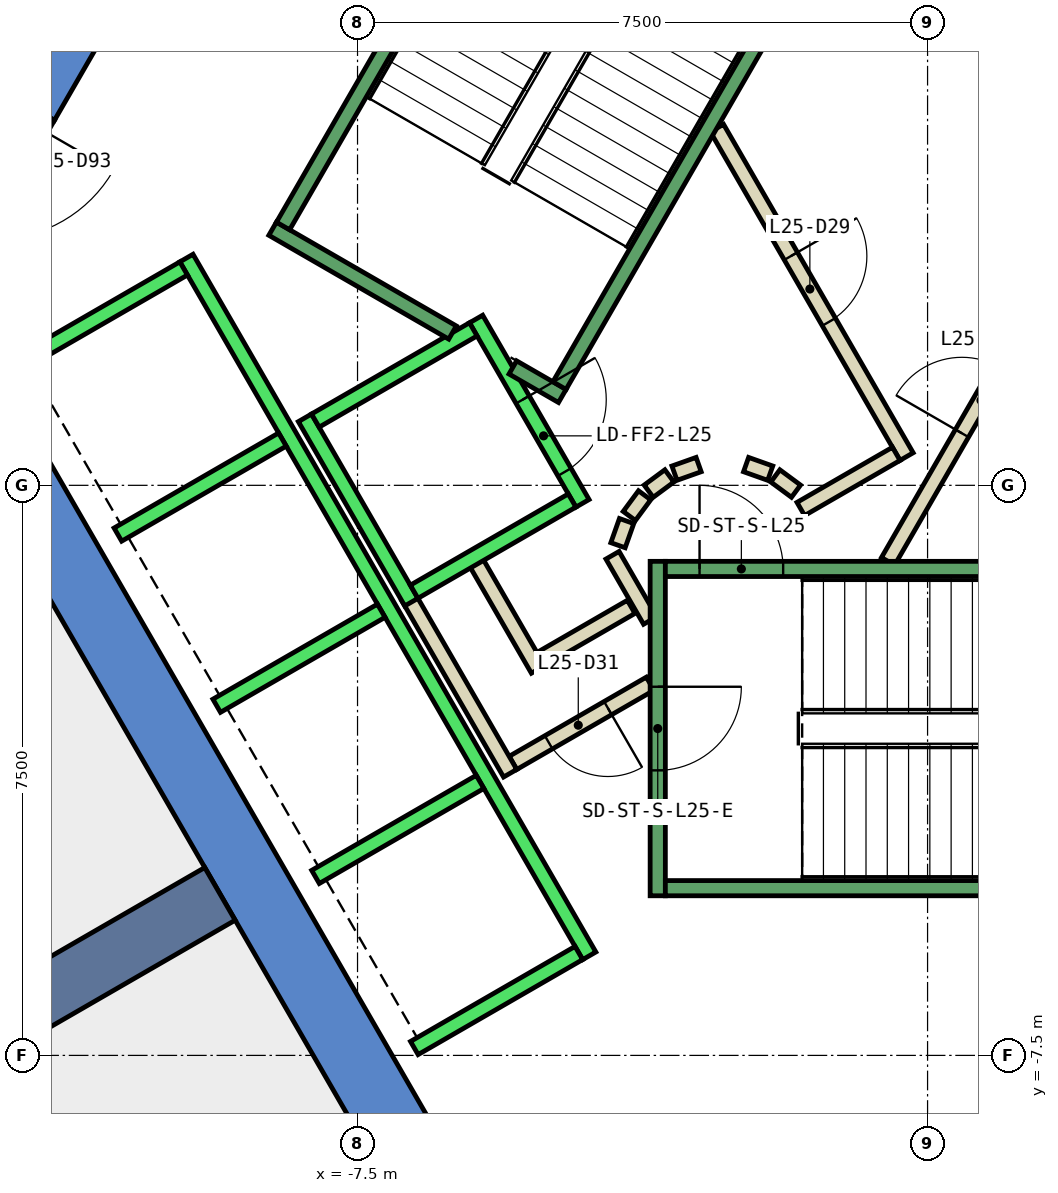
"""IFC4 building model, lengths in metres.
Left out: names, types, materials, properties, quantities, classifications, styles, units other than length and angle.
Written with IfcOpenShell. Run it as: python <this file> out.ifc"""

import sys

from ifc_helpers import new_model, si_unit, direction, frame, frame_2d, origin, place, context, subcontext, project, spatial, polyline, rectangle, outline, extrude, element, fill, save


model = new_model("IFC4")
c1 = context("Model", 3, precision=1e-05, world=origin(), true_north=direction((0.0, 1.0)))
c2 = subcontext(c1, "Body", "Model", "MODEL_VIEW")
j1 = project(units=[si_unit("LENGTHUNIT", "METRE"), si_unit("PLANEANGLEUNIT", "RADIAN")], contexts=[c1])
p1 = place(None, origin())
s1 = spatial("IfcSite", under=j1, at=p1, CompositionType="ELEMENT")
p2 = place(p1, origin())
s2 = spatial("IfcBuilding", under=s1, at=p2, CompositionType="ELEMENT")
p3 = place(p2, frame((0.0, 0.0, 116.0)))
s3 = spatial("IfcBuildingStorey", under=s2, at=p3, CompositionType="ELEMENT", Elevation=116.0)
p4 = place(p3, frame((0.0, 0.0, -0.4)))
e1 = element("IfcWall", 1, at=p4, inside=s3, PredefinedType="SHEAR", context=c2, shape_type="SweptSolid", body=[
    extrude(outline(polyline([(-12.267, 5.252), (-11.488, 4.802), (-6.409, 13.6), (-6.928, 14.5), (-12.267, 5.252)])), origin(), (0.0, 0.0, 1.0), 4.2),
])
p5 = place(p3, frame((0.0, 0.0, 3.6)))
e2 = element("IfcWall", 2, at=p5, inside=s3, PredefinedType="SHEAR", context=c2, shape_type="SweptSolid", body=[
    extrude(outline(polyline([(-13.267, 3.52), (-12.488, 3.07), (-11.488, 4.802), (-12.267, 5.252), (-13.267, 3.52)])), origin(), (0.0, 0.0, 1.0), 0.2),
])
p6 = place(p3, frame((0.0, 0.0, -0.4)))
e3 = element("IfcWall", 3, at=p6, inside=s3, PredefinedType="SHEAR", context=c2, shape_type="SweptSolid", body=[
    extrude(outline(polyline([(-13.856, 2.5), (-6.928, -9.5), (-6.409, -8.6), (-12.817, 2.5), (-13.856, 2.5)])), origin(), (0.0, 0.0, 1.0), 4.2),
])
p7 = place(p3, frame((-9.31, -5.375, -0.4), z_axis=(0.0, 0.0, 1.0), x_axis=(-0.866017533419, -0.500013631625, 0.0)))
e4 = element("IfcWall", 4, at=p7, inside=s3, PredefinedType="SHEAR", context=c2, shape_type="SweptSolid", body=[
    extrude(rectangle(XDim=9.0, YDim=0.8, at=frame_2d((4.5, 0.0))), origin(), (0.0, 0.0, 1.0), 4.2),
])
p8 = place(p3, frame((-3.9, -1.599, 0.0), z_axis=(0.0, 0.0, 1.0), x_axis=(-0.865969445389, -0.500096910261, 0.0)))
e5 = element("IfcWall", 5, at=p8, inside=s3, PredefinedType="PARTITIONING", context=c2, shape_type="SweptSolid", body=[
    extrude(rectangle(XDim=1.373, YDim=0.2, at=frame_2d((0.687, 0.0))), origin(), (0.0, 0.0, 1.0), 3.8),
])
p9 = place(p3, frame((-5.126, -2.422, 0.0), z_axis=(0.0, 0.0, 1.0), x_axis=(-0.500062241894, 0.865989465428, 0.0)))
e6 = element("IfcWall", 6, at=p9, inside=s3, PredefinedType="PARTITIONING", context=c2, shape_type="SweptSolid", body=[
    extrude(rectangle(XDim=1.7, YDim=0.2, at=frame_2d((0.85, 0.0))), origin(), (0.0, 0.0, 1.0), 3.8),
])
p10 = place(p3, frame((-3.65, -2.61, 0.0), z_axis=(0.0, 0.0, 1.0), x_axis=(-0.866072462134, -0.499918483688, 0.0)))
e7 = element("IfcWall", 7, at=p10, inside=s3, PredefinedType="PARTITIONING", context=c2, shape_type="SweptSolid", body=[
    extrude(rectangle(XDim=2.084, YDim=0.2, at=frame_2d((1.042, 0.0))), origin(), (0.0, 0.0, 1.0), 3.8),
])
p11 = place(p10, frame((0.642, 0.0, 0.0)))
e8 = element("IfcOpeningElement", 8, at=p11, cuts=e7, PredefinedType="OPENING", context=c2, shape_type="SweptSolid", body=[
    extrude(rectangle(XDim=0.9, YDim=2.1, at=frame_2d((0.45, 1.05))), frame((0.0, 0.11, 0.0), z_axis=(0.0, -1.0, 0.0), x_axis=(1.0, 0.0, 0.0)), (0.0, 0.0, 1.0), 0.22),
])
p12 = place(p3, frame((-5.492, -3.788, 0.0), z_axis=(0.0, 0.0, 1.0), x_axis=(-0.500008949224, 0.866020236886, 0.0)))
e9 = element("IfcWall", 9, at=p12, inside=s3, PredefinedType="PARTITIONING", context=c2, shape_type="SweptSolid", body=[
    extrude(rectangle(XDim=2.68, YDim=0.2, at=frame_2d((1.34, 0.0))), origin(), (0.0, 0.0, 1.0), 3.8),
])
p13 = place(p3, frame((-4.145, -0.92, 0.0), z_axis=(0.0, 0.0, 1.0), x_axis=(0.499743786207, -0.866173278362, 0.0)))
e10 = element("IfcWall", 10, at=p13, inside=s3, PredefinedType="PARTITIONING", context=c2, shape_type="SweptSolid", body=[
    extrude(rectangle(XDim=0.991, YDim=0.2, at=frame_2d((0.495, 0.0))), origin(), (0.0, 0.0, 1.0), 3.8),
])
p14 = place(p3, frame((-0.52, -1.0, 0.0), z_axis=(0.0, 0.0, 1.0), x_axis=(0.50011622646, 0.865958290007, 0.0)))
e11 = element("IfcWall", 11, at=p14, inside=s3, PredefinedType="PARTITIONING", context=c2, shape_type="SweptSolid", body=[
    extrude(rectangle(XDim=4.991, YDim=0.2, at=frame_2d((2.496, 0.0))), origin(), (0.0, 0.0, 1.0), 3.8),
])
p15 = place(p14, frame((1.945, 0.0, 0.0)))
e12 = element("IfcOpeningElement", 12, at=p15, cuts=e11, PredefinedType="OPENING", context=c2, shape_type="SweptSolid", body=[
    extrude(rectangle(XDim=1.0, YDim=2.1, at=frame_2d((0.5, 1.05))), frame((0.0, 0.11, 0.0), z_axis=(0.0, -1.0, 0.0), x_axis=(1.0, 0.0, 0.0)), (0.0, 0.0, 1.0), 0.22),
])
p16 = place(p3, frame((-2.771, 4.7, 0.0), z_axis=(0.0, 0.0, 1.0), x_axis=(0.499969479948, -0.866043023828, 0.0)))
e13 = element("IfcWall", 13, at=p16, inside=s3, PredefinedType="PARTITIONING", context=c2, shape_type="SweptSolid", body=[
    extrude(rectangle(XDim=4.99, YDim=0.2, at=frame_2d((2.495, 0.0))), origin(), (0.0, 0.0, 1.0), 3.8),
])
p17 = place(p16, frame((1.945, 0.0, 0.0)))
e14 = element("IfcOpeningElement", 14, at=p17, cuts=e13, PredefinedType="OPENING", context=c2, shape_type="SweptSolid", body=[
    extrude(rectangle(XDim=1.0, YDim=2.1, at=frame_2d((0.5, 1.05))), frame((0.0, 0.11, 0.0), z_axis=(0.0, -1.0, 0.0), x_axis=(1.0, 0.0, 0.0)), (0.0, 0.0, 1.0), 0.22),
])
p18 = place(p3, frame((-0.412, 0.414, 0.0), z_axis=(0.0, 0.0, 1.0), x_axis=(-0.866017369001, -0.500013916395, 0.0)))
e15 = element("IfcWall", 15, at=p18, inside=s3, PredefinedType="PARTITIONING", context=c2, shape_type="SweptSolid", body=[
    extrude(rectangle(XDim=1.45, YDim=0.2, at=frame_2d((0.725, 0.0))), origin(), (0.0, 0.0, 1.0), 3.8),
])
p19 = place(p3, frame((-1.731, -0.077, 0.0), z_axis=(0.0, 0.0, 1.0), x_axis=(-0.804311165252, 0.594208338422, 0.0)))
e16 = element("IfcWall", 16, at=p19, inside=s3, PredefinedType="PARTITIONING", context=c2, shape_type="SweptSolid", body=[
    extrude(rectangle(XDim=0.338, YDim=0.2, at=frame_2d((0.169, 0.0))), origin(), (0.0, 0.0, 1.0), 3.8),
])
p20 = place(p3, frame((-2.07, 0.16, 0.0), z_axis=(0.0, 0.0, 1.0), x_axis=(-0.942199461132, 0.335052496547, 0.0)))
e17 = element("IfcWall", 17, at=p20, inside=s3, PredefinedType="PARTITIONING", context=c2, shape_type="SweptSolid", body=[
    extrude(rectangle(XDim=0.337, YDim=0.2, at=frame_2d((0.169, 0.0))), origin(), (0.0, 0.0, 1.0), 3.8),
])
p21 = place(p3, frame((-3.012, 0.273, 0.0), z_axis=(0.0, 0.0, 1.0), x_axis=(-0.942280615813, -0.334824194261, 0.0)))
e18 = element("IfcWall", 18, at=p21, inside=s3, PredefinedType="PARTITIONING", context=c2, shape_type="SweptSolid", body=[
    extrude(rectangle(XDim=0.338, YDim=0.2, at=frame_2d((0.169, 0.0))), origin(), (0.0, 0.0, 1.0), 3.8),
])
p22 = place(p3, frame((-3.397, 0.124, 0.0), z_axis=(0.0, 0.0, 1.0), x_axis=(-0.804311165252, -0.594208338422, 0.0)))
e19 = element("IfcWall", 19, at=p22, inside=s3, PredefinedType="PARTITIONING", context=c2, shape_type="SweptSolid", body=[
    extrude(rectangle(XDim=0.338, YDim=0.2, at=frame_2d((0.169, 0.0))), origin(), (0.0, 0.0, 1.0), 3.8),
])
p23 = place(p3, frame((-3.723, -0.131, 0.0), z_axis=(0.0, 0.0, 1.0), x_axis=(-0.594675113454, -0.803966112121, 0.0)))
e20 = element("IfcWall", 20, at=p23, inside=s3, PredefinedType="PARTITIONING", context=c2, shape_type="SweptSolid", body=[
    extrude(rectangle(XDim=0.338, YDim=0.2, at=frame_2d((0.169, 0.0))), origin(), (0.0, 0.0, 1.0), 3.8),
])
p24 = place(p3, frame((-3.96, -0.47, 0.0), z_axis=(0.0, 0.0, 1.0), x_axis=(-0.334824194261, -0.942280615813, 0.0)))
e21 = element("IfcWall", 21, at=p24, inside=s3, PredefinedType="PARTITIONING", context=c2, shape_type="SweptSolid", body=[
    extrude(rectangle(XDim=0.338, YDim=0.2, at=frame_2d((0.169, 0.0))), origin(), (0.0, 0.0, 1.0), 3.8),
])
p25 = place(p3, frame((-5.94, 2.188, 0.0), z_axis=(0.0, 0.0, 1.0), x_axis=(0.49994636267, -0.866056369097, 0.0)))
e22 = element("IfcWall", 22, at=p25, inside=s3, PredefinedType="STANDARD", context=c2, shape_type="SweptSolid", body=[
    extrude(rectangle(XDim=2.8, YDim=0.2, at=frame_2d((1.4, 0.0))), origin(), (0.0, 0.0, 1.0), 3.8),
])
p26 = place(p25, frame((1.225, 0.0, 0.0)))
e23 = element("IfcOpeningElement", 23, at=p26, cuts=e22, PredefinedType="OPENING", context=c2, shape_type="SweptSolid", body=[
    extrude(rectangle(XDim=1.1, YDim=2.1, at=frame_2d((0.55, 1.05))), frame((0.0, 0.11, 0.0), z_axis=(0.0, -1.0, 0.0), x_axis=(1.0, 0.0, 0.0)), (0.0, 0.0, 1.0), 0.22),
])
p27 = place(p3, frame((-8.192, 0.888, 0.0), z_axis=(0.0, 0.0, 1.0), x_axis=(0.49994636267, -0.866056369097, 0.0)))
e24 = element("IfcWall", 24, at=p27, inside=s3, PredefinedType="STANDARD", context=c2, shape_type="SweptSolid", body=[
    extrude(rectangle(XDim=2.8, YDim=0.2, at=frame_2d((1.4, 0.0))), origin(), (0.0, 0.0, 1.0), 3.8),
])
for number, where, z_axis, x_axis in (
    (25, (-5.977, 2.052, 0.0), (0.0, 0.0, 1.0), (-0.866, -0.5, 0.0)),
    (26, (-4.677, -0.2, 0.0), (0.0, 0.0, 1.0), (-0.866, -0.5, 0.0)),
):
    element("IfcWall", number, at=place(p3, frame(where, z_axis=z_axis, x_axis=x_axis)), inside=s3, PredefinedType="STANDARD", context=c2, shape_type="SweptSolid", body=[
        extrude(rectangle(XDim=2.399, YDim=0.2, at=frame_2d((1.2, 0.0))), origin(), (0.0, 0.0, 1.0), 3.8),
    ])
p28 = place(p3, frame((-9.751, 2.99, 0.0), z_axis=(0.0, 0.0, 1.0), x_axis=(0.50000090737, -0.866024879913, 0.0)))
e27 = element("IfcWall", 27, at=p28, inside=s3, PredefinedType="STANDARD", context=c2, shape_type="SweptSolid", body=[
    extrude(rectangle(XDim=10.6, YDim=0.2, at=frame_2d((5.3, 0.0))), origin(), (0.0, 0.0, 1.0), 3.8),
])
p29 = place(p3, frame((-9.788, 2.853, 0.0), z_axis=(0.0, 0.0, 1.0), x_axis=(-0.865998541277, -0.500046524342, 0.0)))
e28 = element("IfcWall", 28, at=p29, inside=s3, PredefinedType="STANDARD", context=c2, shape_type="SweptSolid", body=[
    extrude(rectangle(XDim=2.5, YDim=0.2, at=frame_2d((1.25, 0.0))), origin(), (0.0, 0.0, 1.0), 3.8),
])
for number, where, z_axis, x_axis in (
    (29, (-8.488, 0.602, 0.0), (0.0, 0.0, 1.0), (-0.866, -0.5, 0.0)),
    (30, (-7.188, -1.65, 0.0), (0.0, 0.0, 1.0), (-0.866, -0.5, 0.0)),
    (31, (-5.888, -3.902, 0.0), (0.0, 0.0, 1.0), (-0.866, -0.5, 0.0)),
    (32, (-4.588, -6.153, 0.0), (0.0, 0.0, 1.0), (-0.866, -0.5, 0.0)),
):
    element("IfcWall", number, at=place(p3, frame(where, z_axis=z_axis, x_axis=x_axis)), inside=s3, PredefinedType="STANDARD", context=c2, shape_type="SweptSolid", body=[
        extrude(rectangle(XDim=2.5, YDim=0.2, at=frame_2d((1.25, 0.0))), origin(), (0.0, 0.0, 1.0), 3.8),
    ])
p30 = place(p3, frame((-3.55, -1.0, 0.0), z_axis=(0.0, 0.0, 1.0), x_axis=(0.0, -1.0, 0.0)))
e33 = element("IfcWall", 33, at=p30, inside=s3, PredefinedType="STANDARD", context=c2, shape_type="SweptSolid", body=[
    extrude(rectangle(XDim=4.4, YDim=0.2, at=frame_2d((2.2, 0.0))), origin(), (0.0, 0.0, 1.0), 3.8),
])
p31 = place(p30, frame((1.65, 0.0, 0.0)))
e34 = element("IfcOpeningElement", 34, at=p31, cuts=e33, PredefinedType="OPENING", context=c2, shape_type="SweptSolid", body=[
    extrude(rectangle(XDim=1.1, YDim=2.2, at=frame_2d((0.55, 1.1))), frame((0.0, 0.11, 0.0), z_axis=(0.0, -1.0, 0.0), x_axis=(1.0, 0.0, 0.0)), (0.0, 0.0, 1.0), 0.22),
])
p32 = place(p3, frame((-3.45, -1.1, 0.0), z_axis=(0.0, 0.0, 1.0), x_axis=(1.0, 0.0, 0.0)))
e35 = element("IfcWall", 35, at=p32, inside=s3, PredefinedType="STANDARD", context=c2, shape_type="SweptSolid", body=[
    extrude(rectangle(XDim=6.9, YDim=0.2, at=frame_2d((3.45, 0.0))), origin(), (0.0, 0.0, 1.0), 3.8),
])
p33 = place(p32, frame((0.45, 0.0, 0.0)))
e36 = element("IfcOpeningElement", 36, at=p33, cuts=e35, PredefinedType="OPENING", context=c2, shape_type="SweptSolid", body=[
    extrude(rectangle(XDim=1.1, YDim=2.2, at=frame_2d((0.55, 1.1))), frame((0.0, 0.11, 0.0), z_axis=(0.0, -1.0, 0.0), x_axis=(1.0, 0.0, 0.0)), (0.0, 0.0, 1.0), 0.22),
])
p34 = place(p3, frame((-3.45, -5.3, 0.0), z_axis=(0.0, 0.0, 1.0), x_axis=(1.0, 0.0, 0.0)))
e37 = element("IfcWall", 37, at=p34, inside=s3, PredefinedType="STANDARD", context=c2, shape_type="SweptSolid", body=[
    extrude(rectangle(XDim=6.9, YDim=0.2, at=frame_2d((3.45, 0.0))), origin(), (0.0, 0.0, 1.0), 3.8),
])
p35 = place(p3, frame((-6.25, 2.01, 0.0), z_axis=(0.0, 0.0, 1.0), x_axis=(-0.86611865017, 0.499838457731, 0.0)))
e38 = element("IfcWall", 38, at=p35, inside=s3, PredefinedType="STANDARD", context=c2, shape_type="SweptSolid", body=[
    extrude(rectangle(XDim=2.733, YDim=0.2, at=frame_2d((1.366, 0.0))), origin(), (0.0, 0.0, 1.0), 3.8),
])
p36 = place(p3, frame((-4.806, 1.176, 0.0), z_axis=(0.0, 0.0, 1.0), x_axis=(-0.866558586415, 0.499075361355, 0.0)))
e39 = element("IfcWall", 39, at=p36, inside=s3, PredefinedType="STANDARD", context=c2, shape_type="SweptSolid", body=[
    extrude(rectangle(XDim=0.751, YDim=0.2, at=frame_2d((0.376, 0.0))), origin(), (0.0, 0.0, 1.0), 3.8),
])
p37 = place(p3, frame((-1.393, 7.288, 0.0), z_axis=(0.0, 0.0, 1.0), x_axis=(-0.499963383562, -0.866046543262, 0.0)))
e40 = element("IfcWall", 40, at=p37, inside=s3, PredefinedType="STANDARD", context=c2, shape_type="SweptSolid", body=[
    extrude(rectangle(XDim=6.9, YDim=0.2, at=frame_2d((3.45, 0.0))), origin(), (0.0, 0.0, 1.0), 3.8),
])
p38 = place(p37, frame((0.45, 0.0, 0.0)))
e41 = element("IfcOpeningElement", 41, at=p38, cuts=e40, PredefinedType="OPENING", context=c2, shape_type="SweptSolid", body=[
    extrude(rectangle(XDim=1.1, YDim=2.2, at=frame_2d((0.55, 1.1))), frame((0.0, 0.11, 0.0), z_axis=(0.0, -1.0, 0.0), x_axis=(1.0, 0.0, 0.0)), (0.0, 0.0, 1.0), 0.22),
])
p39 = place(p3, frame((-5.03, 9.388, 0.0), z_axis=(0.0, 0.0, 1.0), x_axis=(-0.499978703459, -0.866037698999, 0.0)))
e42 = element("IfcWall", 42, at=p39, inside=s3, PredefinedType="STANDARD", context=c2, shape_type="SweptSolid", body=[
    extrude(rectangle(XDim=6.9, YDim=0.2, at=frame_2d((3.45, 0.0))), origin(), (0.0, 0.0, 1.0), 3.8),
])
p40 = place(p15, origin())
e43 = element("IfcDoor", 43, at=p40, inside=s3, OperationType="SINGLE_SWING_LEFT", PredefinedType="DOOR", context=c2, shape_type="SweptSolid", body=[
    extrude(rectangle(XDim=1.0, YDim=2.1, at=frame_2d((0.5, 1.05))), frame((0.0, 0.025, 0.0), z_axis=(0.0, -1.0, 0.0), x_axis=(1.0, 0.0, 0.0)), (0.0, 0.0, 1.0), 0.05),
])
fill(e12, e43)
p41 = place(p17, origin())
e44 = element("IfcDoor", 44, at=p41, inside=s3, OperationType="SINGLE_SWING_RIGHT", PredefinedType="DOOR", context=c2, shape_type="SweptSolid", body=[
    extrude(rectangle(XDim=1.0, YDim=2.1, at=frame_2d((0.5, 1.05))), frame((0.0, 0.025, 0.0), z_axis=(0.0, -1.0, 0.0), x_axis=(1.0, 0.0, 0.0)), (0.0, 0.0, 1.0), 0.05),
])
fill(e14, e44)
p42 = place(p11, origin())
e45 = element("IfcDoor", 45, at=p42, inside=s3, OperationType="SINGLE_SWING_LEFT", PredefinedType="DOOR", context=c2, shape_type="SweptSolid", body=[
    extrude(rectangle(XDim=0.9, YDim=2.1, at=frame_2d((0.45, 1.05))), frame((0.0, 0.025, 0.0), z_axis=(0.0, -1.0, 0.0), x_axis=(1.0, 0.0, 0.0)), (0.0, 0.0, 1.0), 0.05),
])
fill(e8, e45)
p43 = place(p26, origin())
e46 = element("IfcDoor", 46, at=p43, inside=s3, OperationType="SLIDING_TO_LEFT", PredefinedType="DOOR", context=c2, shape_type="SweptSolid", body=[
    extrude(rectangle(XDim=1.1, YDim=2.1, at=frame_2d((0.55, 1.05))), frame((0.0, 0.025, 0.0), z_axis=(0.0, -1.0, 0.0), x_axis=(1.0, 0.0, 0.0)), (0.0, 0.0, 1.0), 0.05),
])
fill(e23, e46)
p44 = place(p33, origin())
e47 = element("IfcDoor", 47, at=p44, inside=s3, OperationType="SINGLE_SWING_LEFT", PredefinedType="DOOR", context=c2, shape_type="SweptSolid", body=[
    extrude(rectangle(XDim=1.1, YDim=2.2, at=frame_2d((0.55, 1.1))), frame((0.0, 0.025, 0.0), z_axis=(0.0, -1.0, 0.0), x_axis=(1.0, 0.0, 0.0)), (0.0, 0.0, 1.0), 0.05),
])
fill(e36, e47)
p45 = place(p31, origin())
e48 = element("IfcDoor", 48, at=p45, inside=s3, OperationType="SINGLE_SWING_LEFT", PredefinedType="DOOR", context=c2, shape_type="SweptSolid", body=[
    extrude(rectangle(XDim=1.1, YDim=2.2, at=frame_2d((0.55, 1.1))), frame((0.0, 0.025, 0.0), z_axis=(0.0, -1.0, 0.0), x_axis=(1.0, 0.0, 0.0)), (0.0, 0.0, 1.0), 0.05),
])
fill(e34, e48)
save(model, sys.argv[1])
